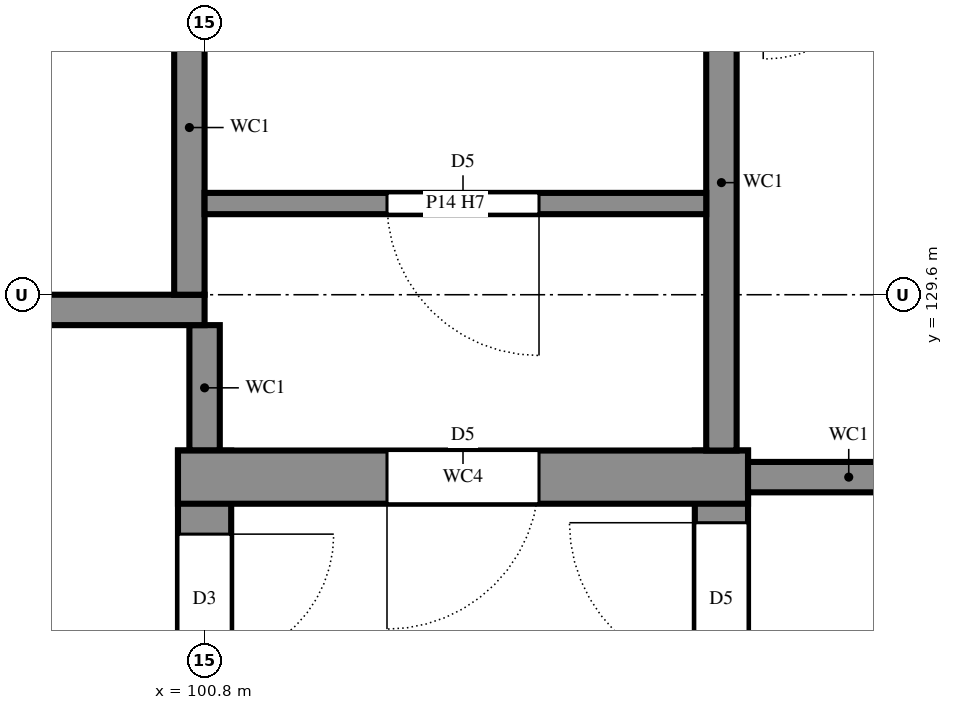
"""IFC4 building model, lengths in metres.
Left out: names, types, materials, properties, quantities, classifications, styles, units other than length and angle.
Written with IfcOpenShell. Run it as: python <this file> out.ifc"""

import sys

from ifc_helpers import new_model, si_unit, direction, frame, frame_2d, origin, place, context, subcontext, project, spatial, rectangle, extrude, element, fill, save


model = new_model("IFC4")
c1 = context("Model", 3, precision=1e-05, world=origin(), true_north=direction((0.0, 1.0)))
c2 = subcontext(c1, "Body", "Model", "MODEL_VIEW")
j1 = project(units=[si_unit("LENGTHUNIT", "METRE"), si_unit("PLANEANGLEUNIT", "RADIAN")], contexts=[c1])
p1 = place(None, origin())
s1 = spatial("IfcSite", under=j1, at=p1, CompositionType="ELEMENT")
p2 = place(p1, origin())
s2 = spatial("IfcBuilding", under=s1, at=p2, CompositionType="ELEMENT")
p3 = place(p2, frame((0.0, 0.0, 18.0)))
s3 = spatial("IfcBuildingStorey", under=s2, at=p3, CompositionType="ELEMENT", Elevation=18.0)
p4 = place(p3, frame((104.2, 125.1, 0.0), z_axis=(0.0, 0.0, 1.0), x_axis=(0.0, 1.0, 0.0)))
e1 = element("IfcWall", 1, at=p4, inside=s3, PredefinedType="SHEAR", context=c2, shape_type="SweptSolid", body=[
    extrude(rectangle(XDim=3.475, YDim=0.35, at=frame_2d((1.737, 0.0))), origin(), (0.0, 0.0, 1.0), 3.6),
])
p5 = place(p4, frame((2.0, 0.0, 0.0)))
e2 = element("IfcOpeningElement", 2, at=p5, cuts=e1, PredefinedType="OPENING", context=c2, shape_type="SweptSolid", body=[
    extrude(rectangle(XDim=1.0, YDim=2.1, at=frame_2d((0.5, 1.05))), frame((0.0, 0.185, 0.0), z_axis=(0.0, -1.0, 0.0), x_axis=(1.0, 0.0, 0.0)), (0.0, 0.0, 1.0), 0.37),
])
p6 = place(p3, frame((100.8, 128.575, 0.0), z_axis=(0.0, 0.0, 1.0), x_axis=(0.0, -1.0, 0.0)))
e3 = element("IfcWall", 3, at=p6, inside=s3, PredefinedType="SHEAR", context=c2, shape_type="SweptSolid", body=[
    extrude(rectangle(XDim=6.35, YDim=0.35, at=frame_2d((3.175, 0.0))), origin(), (0.0, 0.0, 1.0), 3.6),
])
p7 = place(p6, frame((0.55, 0.0, 0.0)))
e4 = element("IfcOpeningElement", 4, at=p7, cuts=e3, PredefinedType="OPENING", context=c2, shape_type="SweptSolid", body=[
    extrude(rectangle(XDim=0.85, YDim=2.1, at=frame_2d((0.425, 1.05))), frame((0.0, 0.185, 0.0), z_axis=(0.0, -1.0, 0.0), x_axis=(1.0, 0.0, 0.0)), (0.0, 0.0, 1.0), 0.37),
])
p8 = place(p3, frame((100.8, 128.575, 0.0), z_axis=(0.0, 0.0, 1.0), x_axis=(0.0, 1.0, 0.0)))
e5 = element("IfcWall", 5, at=p8, inside=s3, PredefinedType="SHEAR", context=c2, shape_type="SweptSolid", body=[
    extrude(rectangle(XDim=0.825, YDim=0.2, at=frame_2d((0.413, 0.0))), origin(), (0.0, 0.0, 1.0), 3.6),
])
p9 = place(p3, frame((104.375, 128.4, 0.0), z_axis=(0.0, 0.0, 1.0), x_axis=(-1.0, 0.0, 0.0)))
e6 = element("IfcWall", 6, at=p9, inside=s3, PredefinedType="SHEAR", context=c2, shape_type="SweptSolid", body=[
    extrude(rectangle(XDim=3.75, YDim=0.35, at=frame_2d((1.875, 0.0))), origin(), (0.0, 0.0, 1.0), 3.6),
])
p10 = place(p9, frame((1.375, 0.0, 0.0)))
e7 = element("IfcOpeningElement", 7, at=p10, cuts=e6, PredefinedType="OPENING", context=c2, shape_type="SweptSolid", body=[
    extrude(rectangle(XDim=1.0, YDim=2.1, at=frame_2d((0.5, 1.05))), frame((0.0, 0.185, 0.0), z_axis=(0.0, -1.0, 0.0), x_axis=(1.0, 0.0, 0.0)), (0.0, 0.0, 1.0), 0.37),
])
p11 = place(p3, frame((104.375, 128.4, 0.0), z_axis=(0.0, 0.0, 1.0), x_axis=(1.0, 0.0, 0.0)))
e8 = element("IfcWall", 8, at=p11, inside=s3, PredefinedType="SHEAR", context=c2, shape_type="SweptSolid", body=[
    extrude(rectangle(XDim=1.325, YDim=0.2, at=frame_2d((0.663, 0.0))), origin(), (0.0, 0.0, 1.0), 3.6),
])
p12 = place(p3, frame((104.2, 132.1, 0.0), z_axis=(0.0, 0.0, 1.0), x_axis=(0.0, -1.0, 0.0)))
e9 = element("IfcWall", 9, at=p12, inside=s3, PredefinedType="SHEAR", context=c2, shape_type="SweptSolid", body=[
    extrude(rectangle(XDim=3.525, YDim=0.2, at=frame_2d((1.763, 0.0))), origin(), (0.0, 0.0, 1.0), 3.6),
])
p13 = place(p3, frame((98.4, 129.5, 0.0), z_axis=(0.0, 0.0, 1.0), x_axis=(1.0, 0.0, 0.0)))
e10 = element("IfcWall", 10, at=p13, inside=s3, PredefinedType="SHEAR", context=c2, shape_type="SweptSolid", body=[
    extrude(rectangle(XDim=2.4, YDim=0.2, at=frame_2d((1.2, 0.0))), origin(), (0.0, 0.0, 1.0), 3.6),
])
p14 = place(p3, frame((100.7, 129.6, 0.0), z_axis=(0.0, 0.0, 1.0), x_axis=(0.0, 1.0, 0.0)))
e11 = element("IfcWall", 11, at=p14, inside=s3, PredefinedType="SHEAR", context=c2, shape_type="SweptSolid", body=[
    extrude(rectangle(XDim=2.2, YDim=0.2, at=frame_2d((1.1, 0.0))), origin(), (0.0, 0.0, 1.0), 3.6),
])
p15 = place(p3, frame((100.8, 130.2, 0.0), z_axis=(0.0, 0.0, 1.0), x_axis=(1.0, 0.0, 0.0)))
e12 = element("IfcWall", 12, at=p15, inside=s3, PredefinedType="PARTITIONING", context=c2, shape_type="SweptSolid", body=[
    extrude(rectangle(XDim=3.3, YDim=0.14, at=frame_2d((1.65, 0.0))), origin(), (0.0, 0.0, 1.0), 3.46),
])
p16 = place(p15, frame((1.2, 0.0, 0.0)))
e13 = element("IfcOpeningElement", 13, at=p16, cuts=e12, PredefinedType="OPENING", context=c2, shape_type="SweptSolid", body=[
    extrude(rectangle(XDim=1.0, YDim=2.1, at=frame_2d((0.5, 1.05))), frame((0.0, 0.08, 0.0), z_axis=(0.0, -1.0, 0.0), x_axis=(1.0, 0.0, 0.0)), (0.0, 0.0, 1.0), 0.16),
])
p17 = place(p16, frame((1.0, 0.0, 0.0), z_axis=(0.0, 0.0, 1.0), x_axis=(-1.0, 0.0, 0.0)))
e14 = element("IfcDoor", 14, at=p17, inside=s3, OperationType="SINGLE_SWING_RIGHT", PredefinedType="DOOR", context=c2, shape_type="SweptSolid", body=[
    extrude(rectangle(XDim=1.0, YDim=2.1, at=frame_2d((0.5, 1.05))), frame((0.0, 0.025, 0.0), z_axis=(0.0, -1.0, 0.0), x_axis=(1.0, 0.0, 0.0)), (0.0, 0.0, 1.0), 0.05),
])
fill(e13, e14)
p18 = place(p10, origin())
e15 = element("IfcDoor", 15, at=p18, inside=s3, OperationType="SINGLE_SWING_LEFT", PredefinedType="DOOR", context=c2, shape_type="SweptSolid", body=[
    extrude(rectangle(XDim=1.0, YDim=2.1, at=frame_2d((0.5, 1.05))), frame((0.0, 0.025, 0.0), z_axis=(0.0, -1.0, 0.0), x_axis=(1.0, 0.0, 0.0)), (0.0, 0.0, 1.0), 0.05),
])
fill(e7, e15)
p19 = place(p7, origin())
e16 = element("IfcDoor", 16, at=p19, inside=s3, OperationType="SINGLE_SWING_RIGHT", PredefinedType="DOOR", context=c2, shape_type="SweptSolid", body=[
    extrude(rectangle(XDim=0.85, YDim=2.1, at=frame_2d((0.425, 1.05))), frame((0.0, 0.025, 0.0), z_axis=(0.0, -1.0, 0.0), x_axis=(1.0, 0.0, 0.0)), (0.0, 0.0, 1.0), 0.05),
])
fill(e4, e16)
p20 = place(p5, origin())
e17 = element("IfcDoor", 17, at=p20, inside=s3, OperationType="SINGLE_SWING_LEFT", PredefinedType="DOOR", context=c2, shape_type="SweptSolid", body=[
    extrude(rectangle(XDim=1.0, YDim=2.1, at=frame_2d((0.5, 1.05))), frame((0.0, 0.025, 0.0), z_axis=(0.0, -1.0, 0.0), x_axis=(1.0, 0.0, 0.0)), (0.0, 0.0, 1.0), 0.05),
])
fill(e2, e17)
save(model, sys.argv[1])
